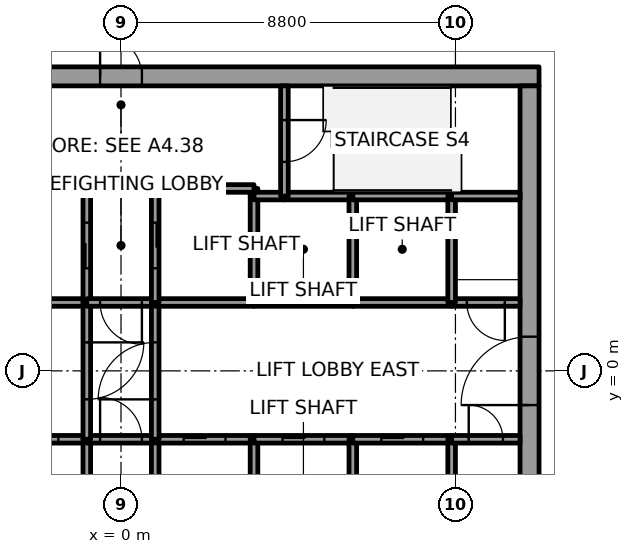
"""IFC4 building model, lengths in metres.
Left out: names, types, materials, properties, quantities, classifications, styles, units other than length and angle.
Written with IfcOpenShell. Run it as: python <this file> out.ifc"""

import sys

from ifc_helpers import new_model, si_unit, direction, frame, frame_2d, origin, place, context, subcontext, project, spatial, rectangle, extrude, element, fill, save


model = new_model("IFC4")
c1 = context("Model", 3, precision=1e-05, world=origin(), true_north=direction((0.0, 1.0)))
c2 = subcontext(c1, "Body", "Model", "MODEL_VIEW")
j1 = project(units=[si_unit("LENGTHUNIT", "METRE"), si_unit("PLANEANGLEUNIT", "RADIAN")], contexts=[c1])
p1 = place(None, origin())
s1 = spatial("IfcSite", under=j1, at=p1, CompositionType="ELEMENT")
p2 = place(p1, origin())
s2 = spatial("IfcBuilding", under=s1, at=p2, CompositionType="ELEMENT")
p3 = place(p2, frame((0.0, 0.0, 165.8)))
s3 = spatial("IfcBuildingStorey", under=s2, at=p3, CompositionType="ELEMENT", Elevation=165.8)
p4 = place(p3, frame((-11.0, 7.75, 0.0), z_axis=(0.0, 0.0, 1.0), x_axis=(1.0, 0.0, 0.0)))
e1 = element("IfcWall", 1, at=p4, inside=s3, PredefinedType="SHEAR", context=c2, shape_type="SweptSolid", body=[
    extrude(rectangle(XDim=22.0, YDim=0.5, at=frame_2d((11.0, 0.0))), origin(), (0.0, 0.0, 1.0), 4.0),
])
p5 = place(p4, frame((10.45, 0.0, 0.0)))
e2 = element("IfcOpeningElement", 2, at=p5, cuts=e1, PredefinedType="OPENING", context=c2, shape_type="SweptSolid", body=[
    extrude(rectangle(XDim=1.1, YDim=2.1, at=frame_2d((0.55, 1.05))), frame((0.0, 0.25, 0.0), z_axis=(0.0, -1.0, 0.0), x_axis=(1.0, 0.0, 0.0)), (0.0, 0.0, 1.0), 0.5),
])
p6 = place(p3, frame((10.75, -7.5, 0.0), z_axis=(0.0, 0.0, 1.0), x_axis=(0.0, 1.0, 0.0)))
e3 = element("IfcWall", 3, at=p6, inside=s3, PredefinedType="SHEAR", context=c2, shape_type="SweptSolid", body=[
    extrude(rectangle(XDim=15.0, YDim=0.5, at=frame_2d((7.5, 0.0))), origin(), (0.0, 0.0, 1.0), 4.0),
])
p7 = place(p6, frame((6.6, 0.0, 0.0)))
e4 = element("IfcOpeningElement", 4, at=p7, cuts=e3, PredefinedType="OPENING", context=c2, shape_type="SweptSolid", body=[
    extrude(rectangle(XDim=1.8, YDim=2.1, at=frame_2d((0.9, 1.05))), frame((0.0, 0.25, 0.0), z_axis=(0.0, -1.0, 0.0), x_axis=(1.0, 0.0, 0.0)), (0.0, 0.0, 1.0), 0.5),
])
p8 = place(p3, frame((-3.5, -1.8, 0.0), z_axis=(0.0, 0.0, 1.0), x_axis=(1.0, 0.0, 0.0)))
e5 = element("IfcWall", 5, at=p8, inside=s3, PredefinedType="SOLIDWALL", context=c2, shape_type="SweptSolid", body=[
    extrude(rectangle(XDim=2.6, YDim=0.2, at=frame_2d((1.3, 0.0))), origin(), (0.0, 0.0, 1.0), 3.85),
])
p9 = place(p8, frame((0.75, 0.0, 0.0)))
e6 = element("IfcOpeningElement", 6, at=p9, cuts=e5, PredefinedType="OPENING", context=c2, shape_type="SweptSolid", body=[
    extrude(rectangle(XDim=1.1, YDim=2.1, at=frame_2d((0.55, 1.05))), frame((0.0, 0.1, 0.0), z_axis=(0.0, -1.0, 0.0), x_axis=(1.0, 0.0, 0.0)), (0.0, 0.0, 1.0), 0.2),
])
p10 = place(p3, frame((-0.9, 1.8, 0.0), z_axis=(0.0, 0.0, 1.0), x_axis=(-1.0, 0.0, 0.0)))
e7 = element("IfcWall", 7, at=p10, inside=s3, PredefinedType="SOLIDWALL", context=c2, shape_type="SweptSolid", body=[
    extrude(rectangle(XDim=2.6, YDim=0.2, at=frame_2d((1.3, 0.0))), origin(), (0.0, 0.0, 1.0), 3.85),
])
p11 = place(p3, frame((-0.9, 1.8, 0.0), z_axis=(0.0, 0.0, 1.0), x_axis=(0.0, 1.0, 0.0)))
e8 = element("IfcWall", 8, at=p11, inside=s3, PredefinedType="SOLIDWALL", context=c2, shape_type="SweptSolid", body=[
    extrude(rectangle(XDim=3.0, YDim=0.2, at=frame_2d((1.5, 0.0))), origin(), (0.0, 0.0, 1.0), 3.85),
])
p12 = place(p11, frame((0.9, 0.0, 0.0)))
e9 = element("IfcOpeningElement", 9, at=p12, cuts=e8, PredefinedType="OPENING", context=c2, shape_type="SweptSolid", body=[
    extrude(rectangle(XDim=1.2, YDim=2.1, at=frame_2d((0.6, 1.05))), frame((0.0, 0.1, 0.0), z_axis=(0.0, -1.0, 0.0), x_axis=(1.0, 0.0, 0.0)), (0.0, 0.0, 1.0), 0.2),
])
p13 = place(p3, frame((-0.9, 4.8, 0.0), z_axis=(0.0, 0.0, 1.0), x_axis=(-1.0, 0.0, 0.0)))
e10 = element("IfcWall", 10, at=p13, inside=s3, PredefinedType="SOLIDWALL", context=c2, shape_type="SweptSolid", body=[
    extrude(rectangle(XDim=2.6, YDim=0.2, at=frame_2d((1.3, 0.0))), origin(), (0.0, 0.0, 1.0), 3.85),
])
p14 = place(p3, frame((-0.9, -4.6, 0.0), z_axis=(0.0, 0.0, 1.0), x_axis=(0.0, 1.0, 0.0)))
e11 = element("IfcWall", 11, at=p14, inside=s3, PredefinedType="SOLIDWALL", context=c2, shape_type="SweptSolid", body=[
    extrude(rectangle(XDim=2.8, YDim=0.2, at=frame_2d((1.4, 0.0))), origin(), (0.0, 0.0, 1.0), 3.85),
])
p15 = place(p3, frame((-0.9, -1.8, 0.0), z_axis=(0.0, 0.0, 1.0), x_axis=(1.0, 0.0, 0.0)))
e12 = element("IfcWall", 12, at=p15, inside=s3, PredefinedType="SOLIDWALL", context=c2, shape_type="SweptSolid", body=[
    extrude(rectangle(XDim=1.8, YDim=0.2, at=frame_2d((0.9, 0.0))), origin(), (0.0, 0.0, 1.0), 3.85),
])
p16 = place(p15, frame((0.35, 0.0, 0.0)))
e13 = element("IfcOpeningElement", 13, at=p16, cuts=e12, PredefinedType="OPENING", context=c2, shape_type="SweptSolid", body=[
    extrude(rectangle(XDim=1.1, YDim=2.1, at=frame_2d((0.55, 1.05))), frame((0.0, 0.1, 0.0), z_axis=(0.0, -1.0, 0.0), x_axis=(1.0, 0.0, 0.0)), (0.0, 0.0, 1.0), 0.2),
])
p17 = place(p3, frame((-0.9, 1.8, 0.0), z_axis=(0.0, 0.0, 1.0), x_axis=(0.0, -1.0, 0.0)))
e14 = element("IfcWall", 14, at=p17, inside=s3, PredefinedType="SOLIDWALL", context=c2, shape_type="SweptSolid", body=[
    extrude(rectangle(XDim=3.6, YDim=0.2, at=frame_2d((1.8, 0.0))), origin(), (0.0, 0.0, 1.0), 3.85),
])
p18 = place(p17, frame((1.05, 0.0, 0.0)))
e15 = element("IfcOpeningElement", 15, at=p18, cuts=e14, PredefinedType="OPENING", context=c2, shape_type="SweptSolid", body=[
    extrude(rectangle(XDim=1.5, YDim=2.1, at=frame_2d((0.75, 1.05))), frame((0.0, 0.1, 0.0), z_axis=(0.0, -1.0, 0.0), x_axis=(1.0, 0.0, 0.0)), (0.0, 0.0, 1.0), 0.2),
])
p19 = place(p3, frame((0.9, 1.8, 0.0), z_axis=(0.0, 0.0, 1.0), x_axis=(-1.0, 0.0, 0.0)))
e16 = element("IfcWall", 16, at=p19, inside=s3, PredefinedType="SOLIDWALL", context=c2, shape_type="SweptSolid", body=[
    extrude(rectangle(XDim=1.8, YDim=0.2, at=frame_2d((0.9, 0.0))), origin(), (0.0, 0.0, 1.0), 3.85),
])
p20 = place(p19, frame((0.35, 0.0, 0.0)))
e17 = element("IfcOpeningElement", 17, at=p20, cuts=e16, PredefinedType="OPENING", context=c2, shape_type="SweptSolid", body=[
    extrude(rectangle(XDim=1.1, YDim=2.1, at=frame_2d((0.55, 1.05))), frame((0.0, 0.1, 0.0), z_axis=(0.0, -1.0, 0.0), x_axis=(1.0, 0.0, 0.0)), (0.0, 0.0, 1.0), 0.2),
])
p21 = place(p3, frame((0.9, -1.8, 0.0), z_axis=(0.0, 0.0, 1.0), x_axis=(0.0, -1.0, 0.0)))
e18 = element("IfcWall", 18, at=p21, inside=s3, PredefinedType="SOLIDWALL", context=c2, shape_type="SweptSolid", body=[
    extrude(rectangle(XDim=2.8, YDim=0.2, at=frame_2d((1.4, 0.0))), origin(), (0.0, 0.0, 1.0), 3.85),
])
p22 = place(p3, frame((0.9, -1.8, 0.0), z_axis=(0.0, 0.0, 1.0), x_axis=(1.0, 0.0, 0.0)))
e19 = element("IfcWall", 19, at=p22, inside=s3, PredefinedType="SOLIDWALL", context=c2, shape_type="SweptSolid", body=[
    extrude(rectangle(XDim=2.6, YDim=0.2, at=frame_2d((1.3, 0.0))), origin(), (0.0, 0.0, 1.0), 3.85),
])
p23 = place(p22, frame((0.75, 0.0, 0.0)))
e20 = element("IfcOpeningElement", 20, at=p23, cuts=e19, PredefinedType="OPENING", context=c2, shape_type="SweptSolid", body=[
    extrude(rectangle(XDim=1.1, YDim=2.1, at=frame_2d((0.55, 1.05))), frame((0.0, 0.1, 0.0), z_axis=(0.0, -1.0, 0.0), x_axis=(1.0, 0.0, 0.0)), (0.0, 0.0, 1.0), 0.2),
])
p24 = place(p3, frame((0.9, -1.8, 0.0), z_axis=(0.0, 0.0, 1.0), x_axis=(0.0, 1.0, 0.0)))
e21 = element("IfcWall", 21, at=p24, inside=s3, PredefinedType="SOLIDWALL", context=c2, shape_type="SweptSolid", body=[
    extrude(rectangle(XDim=3.6, YDim=0.2, at=frame_2d((1.8, 0.0))), origin(), (0.0, 0.0, 1.0), 3.85),
])
p25 = place(p24, frame((1.05, 0.0, 0.0)))
e22 = element("IfcOpeningElement", 22, at=p25, cuts=e21, PredefinedType="OPENING", context=c2, shape_type="SweptSolid", body=[
    extrude(rectangle(XDim=1.5, YDim=2.1, at=frame_2d((0.75, 1.05))), frame((0.0, 0.1, 0.0), z_axis=(0.0, -1.0, 0.0), x_axis=(1.0, 0.0, 0.0)), (0.0, 0.0, 1.0), 0.2),
])
p26 = place(p3, frame((3.5, 1.8, 0.0), z_axis=(0.0, 0.0, 1.0), x_axis=(-1.0, 0.0, 0.0)))
e23 = element("IfcWall", 23, at=p26, inside=s3, PredefinedType="SOLIDWALL", context=c2, shape_type="SweptSolid", body=[
    extrude(rectangle(XDim=2.6, YDim=0.2, at=frame_2d((1.3, 0.0))), origin(), (0.0, 0.0, 1.0), 3.85),
])
p27 = place(p3, frame((3.5, 4.6, 0.0), z_axis=(0.0, 0.0, 1.0), x_axis=(0.0, 1.0, 0.0)))
e24 = element("IfcWall", 24, at=p27, inside=s3, PredefinedType="SOLIDWALL", context=c2, shape_type="SweptSolid", body=[
    extrude(rectangle(XDim=0.2, YDim=0.2, at=frame_2d((0.1, 0.0))), origin(), (0.0, 0.0, 1.0), 3.85),
])
p28 = place(p3, frame((3.5, 4.8, 0.0), z_axis=(0.0, 0.0, 1.0), x_axis=(-1.0, 0.0, 0.0)))
e25 = element("IfcWall", 25, at=p28, inside=s3, PredefinedType="SOLIDWALL", context=c2, shape_type="SweptSolid", body=[
    extrude(rectangle(XDim=2.6, YDim=0.2, at=frame_2d((1.3, 0.0))), origin(), (0.0, 0.0, 1.0), 3.85),
])
p29 = place(p3, frame((0.9, 4.8, 0.0), z_axis=(0.0, 0.0, 1.0), x_axis=(0.0, -1.0, 0.0)))
e26 = element("IfcWall", 26, at=p29, inside=s3, PredefinedType="SOLIDWALL", context=c2, shape_type="SweptSolid", body=[
    extrude(rectangle(XDim=3.0, YDim=0.2, at=frame_2d((1.5, 0.0))), origin(), (0.0, 0.0, 1.0), 3.85),
])
p30 = place(p29, frame((0.9, 0.0, 0.0)))
e27 = element("IfcOpeningElement", 27, at=p30, cuts=e26, PredefinedType="OPENING", context=c2, shape_type="SweptSolid", body=[
    extrude(rectangle(XDim=1.2, YDim=2.1, at=frame_2d((0.6, 1.05))), frame((0.0, 0.1, 0.0), z_axis=(0.0, -1.0, 0.0), x_axis=(1.0, 0.0, 0.0)), (0.0, 0.0, 1.0), 0.2),
])
p31 = place(p3, frame((3.5, -4.6, 0.0), z_axis=(0.0, 0.0, 1.0), x_axis=(0.0, 1.0, 0.0)))
e28 = element("IfcWall", 28, at=p31, inside=s3, PredefinedType="SOLIDWALL", context=c2, shape_type="SweptSolid", body=[
    extrude(rectangle(XDim=2.8, YDim=0.2, at=frame_2d((1.4, 0.0))), origin(), (0.0, 0.0, 1.0), 3.85),
])
p32 = place(p3, frame((3.5, -1.8, 0.0), z_axis=(0.0, 0.0, 1.0), x_axis=(1.0, 0.0, 0.0)))
e29 = element("IfcWall", 29, at=p32, inside=s3, PredefinedType="SOLIDWALL", context=c2, shape_type="SweptSolid", body=[
    extrude(rectangle(XDim=2.6, YDim=0.2, at=frame_2d((1.3, 0.0))), origin(), (0.0, 0.0, 1.0), 3.85),
])
p33 = place(p32, frame((0.75, 0.0, 0.0)))
e30 = element("IfcOpeningElement", 30, at=p33, cuts=e29, PredefinedType="OPENING", context=c2, shape_type="SweptSolid", body=[
    extrude(rectangle(XDim=1.1, YDim=2.1, at=frame_2d((0.55, 1.05))), frame((0.0, 0.1, 0.0), z_axis=(0.0, -1.0, 0.0), x_axis=(1.0, 0.0, 0.0)), (0.0, 0.0, 1.0), 0.2),
])
p34 = place(p3, frame((6.1, 1.8, 0.0), z_axis=(0.0, 0.0, 1.0), x_axis=(-1.0, 0.0, 0.0)))
e31 = element("IfcWall", 31, at=p34, inside=s3, PredefinedType="SOLIDWALL", context=c2, shape_type="SweptSolid", body=[
    extrude(rectangle(XDim=2.6, YDim=0.2, at=frame_2d((1.3, 0.0))), origin(), (0.0, 0.0, 1.0), 3.85),
])
p35 = place(p3, frame((3.5, 1.8, 0.0), z_axis=(0.0, 0.0, 1.0), x_axis=(0.0, 1.0, 0.0)))
e32 = element("IfcWall", 32, at=p35, inside=s3, PredefinedType="SOLIDWALL", context=c2, shape_type="SweptSolid", body=[
    extrude(rectangle(XDim=2.8, YDim=0.2, at=frame_2d((1.4, 0.0))), origin(), (0.0, 0.0, 1.0), 3.85),
])
p36 = place(p3, frame((4.3, 4.6, 0.0), z_axis=(0.0, 0.0, 1.0), x_axis=(-1.0, 0.0, 0.0)))
e33 = element("IfcWall", 33, at=p36, inside=s3, PredefinedType="SOLIDWALL", context=c2, shape_type="SweptSolid", body=[
    extrude(rectangle(XDim=0.8, YDim=0.2, at=frame_2d((0.4, 0.0))), origin(), (0.0, 0.0, 1.0), 3.85),
])
p37 = place(p3, frame((6.1, 4.6, 0.0), z_axis=(0.0, 0.0, 1.0), x_axis=(-1.0, 0.0, 0.0)))
e34 = element("IfcWall", 34, at=p37, inside=s3, PredefinedType="SOLIDWALL", context=c2, shape_type="SweptSolid", body=[
    extrude(rectangle(XDim=1.8, YDim=0.2, at=frame_2d((0.9, 0.0))), origin(), (0.0, 0.0, 1.0), 3.85),
])
p38 = place(p3, frame((4.3, 7.5, 0.0), z_axis=(0.0, 0.0, 1.0), x_axis=(0.0, -1.0, 0.0)))
e35 = element("IfcWall", 35, at=p38, inside=s3, PredefinedType="SOLIDWALL", context=c2, shape_type="SweptSolid", body=[
    extrude(rectangle(XDim=2.9, YDim=0.2, at=frame_2d((1.45, 0.0))), origin(), (0.0, 0.0, 1.0), 3.85),
])
p39 = place(p38, frame((0.9, 0.0, 0.0)))
e36 = element("IfcOpeningElement", 36, at=p39, cuts=e35, PredefinedType="OPENING", context=c2, shape_type="SweptSolid", body=[
    extrude(rectangle(XDim=1.1, YDim=2.1, at=frame_2d((0.55, 1.05))), frame((0.0, 0.1, 0.0), z_axis=(0.0, -1.0, 0.0), x_axis=(1.0, 0.0, 0.0)), (0.0, 0.0, 1.0), 0.2),
])
p40 = place(p3, frame((6.1, -4.6, 0.0), z_axis=(0.0, 0.0, 1.0), x_axis=(0.0, 1.0, 0.0)))
e37 = element("IfcWall", 37, at=p40, inside=s3, PredefinedType="SOLIDWALL", context=c2, shape_type="SweptSolid", body=[
    extrude(rectangle(XDim=2.8, YDim=0.2, at=frame_2d((1.4, 0.0))), origin(), (0.0, 0.0, 1.0), 3.85),
])
p41 = place(p3, frame((6.1, -1.8, 0.0), z_axis=(0.0, 0.0, 1.0), x_axis=(1.0, 0.0, 0.0)))
e38 = element("IfcWall", 38, at=p41, inside=s3, PredefinedType="SOLIDWALL", context=c2, shape_type="SweptSolid", body=[
    extrude(rectangle(XDim=2.6, YDim=0.2, at=frame_2d((1.3, 0.0))), origin(), (0.0, 0.0, 1.0), 3.85),
])
p42 = place(p41, frame((0.75, 0.0, 0.0)))
e39 = element("IfcOpeningElement", 39, at=p42, cuts=e38, PredefinedType="OPENING", context=c2, shape_type="SweptSolid", body=[
    extrude(rectangle(XDim=1.1, YDim=2.1, at=frame_2d((0.55, 1.05))), frame((0.0, 0.1, 0.0), z_axis=(0.0, -1.0, 0.0), x_axis=(1.0, 0.0, 0.0)), (0.0, 0.0, 1.0), 0.2),
])
p43 = place(p3, frame((8.7, 1.8, 0.0), z_axis=(0.0, 0.0, 1.0), x_axis=(-1.0, 0.0, 0.0)))
e40 = element("IfcWall", 40, at=p43, inside=s3, PredefinedType="SOLIDWALL", context=c2, shape_type="SweptSolid", body=[
    extrude(rectangle(XDim=2.6, YDim=0.2, at=frame_2d((1.3, 0.0))), origin(), (0.0, 0.0, 1.0), 3.85),
])
p44 = place(p3, frame((6.1, 1.8, 0.0), z_axis=(0.0, 0.0, 1.0), x_axis=(0.0, 1.0, 0.0)))
e41 = element("IfcWall", 41, at=p44, inside=s3, PredefinedType="SOLIDWALL", context=c2, shape_type="SweptSolid", body=[
    extrude(rectangle(XDim=2.8, YDim=0.2, at=frame_2d((1.4, 0.0))), origin(), (0.0, 0.0, 1.0), 3.85),
])
p45 = place(p3, frame((8.7, 4.6, 0.0), z_axis=(0.0, 0.0, 1.0), x_axis=(-1.0, 0.0, 0.0)))
e42 = element("IfcWall", 42, at=p45, inside=s3, PredefinedType="SOLIDWALL", context=c2, shape_type="SweptSolid", body=[
    extrude(rectangle(XDim=2.6, YDim=0.2, at=frame_2d((1.3, 0.0))), origin(), (0.0, 0.0, 1.0), 3.85),
])
p46 = place(p3, frame((8.7, -1.8, 0.0), z_axis=(0.0, 0.0, 1.0), x_axis=(0.0, -1.0, 0.0)))
e43 = element("IfcWall", 43, at=p46, inside=s3, PredefinedType="SOLIDWALL", context=c2, shape_type="SweptSolid", body=[
    extrude(rectangle(XDim=2.8, YDim=0.2, at=frame_2d((1.4, 0.0))), origin(), (0.0, 0.0, 1.0), 3.85),
])
p47 = place(p3, frame((8.7, -1.8, 0.0), z_axis=(0.0, 0.0, 1.0), x_axis=(1.0, 0.0, 0.0)))
e44 = element("IfcWall", 44, at=p47, inside=s3, PredefinedType="SOLIDWALL", context=c2, shape_type="SweptSolid", body=[
    extrude(rectangle(XDim=1.8, YDim=0.2, at=frame_2d((0.9, 0.0))), origin(), (0.0, 0.0, 1.0), 3.85),
])
p48 = place(p47, frame((0.45, 0.0, 0.0)))
e45 = element("IfcOpeningElement", 45, at=p48, cuts=e44, PredefinedType="OPENING", context=c2, shape_type="SweptSolid", body=[
    extrude(rectangle(XDim=0.9, YDim=2.1, at=frame_2d((0.45, 1.05))), frame((0.0, 0.1, 0.0), z_axis=(0.0, -1.0, 0.0), x_axis=(1.0, 0.0, 0.0)), (0.0, 0.0, 1.0), 0.2),
])
p49 = place(p3, frame((10.5, 1.8, 0.0), z_axis=(0.0, 0.0, 1.0), x_axis=(-1.0, 0.0, 0.0)))
e46 = element("IfcWall", 46, at=p49, inside=s3, PredefinedType="SOLIDWALL", context=c2, shape_type="SweptSolid", body=[
    extrude(rectangle(XDim=1.8, YDim=0.2, at=frame_2d((0.9, 0.0))), origin(), (0.0, 0.0, 1.0), 3.85),
])
p50 = place(p49, frame((0.4, 0.0, 0.0)))
e47 = element("IfcOpeningElement", 47, at=p50, cuts=e46, PredefinedType="OPENING", context=c2, shape_type="SweptSolid", body=[
    extrude(rectangle(XDim=1.0, YDim=2.1, at=frame_2d((0.5, 1.05))), frame((0.0, 0.1, 0.0), z_axis=(0.0, -1.0, 0.0), x_axis=(1.0, 0.0, 0.0)), (0.0, 0.0, 1.0), 0.2),
])
p51 = place(p3, frame((8.7, 4.6, 0.0), z_axis=(0.0, 0.0, 1.0), x_axis=(0.0, -1.0, 0.0)))
e48 = element("IfcWall", 48, at=p51, inside=s3, PredefinedType="SOLIDWALL", context=c2, shape_type="SweptSolid", body=[
    extrude(rectangle(XDim=2.8, YDim=0.2, at=frame_2d((1.4, 0.0))), origin(), (0.0, 0.0, 1.0), 3.85),
])
p52 = place(p3, frame((10.5, 4.6, 0.0), z_axis=(0.0, 0.0, 1.0), x_axis=(-1.0, 0.0, 0.0)))
e49 = element("IfcWall", 49, at=p52, inside=s3, PredefinedType="SOLIDWALL", context=c2, shape_type="SweptSolid", body=[
    extrude(rectangle(XDim=1.8, YDim=0.2, at=frame_2d((0.9, 0.0))), origin(), (0.0, 0.0, 1.0), 3.85),
])
p53 = place(p9, origin())
e50 = element("IfcDoor", 50, at=p53, inside=s3, OperationType="SLIDING_TO_RIGHT", PredefinedType="DOOR", context=c2, shape_type="SweptSolid", body=[
    extrude(rectangle(XDim=1.1, YDim=2.1, at=frame_2d((0.55, 1.05))), frame((0.0, 0.025, 0.0), z_axis=(0.0, -1.0, 0.0), x_axis=(1.0, 0.0, 0.0)), (0.0, 0.0, 1.0), 0.05),
])
fill(e6, e50)
p54 = place(p23, origin())
e51 = element("IfcDoor", 51, at=p54, inside=s3, OperationType="SLIDING_TO_LEFT", PredefinedType="DOOR", context=c2, shape_type="SweptSolid", body=[
    extrude(rectangle(XDim=1.1, YDim=2.1, at=frame_2d((0.55, 1.05))), frame((0.0, 0.025, 0.0), z_axis=(0.0, -1.0, 0.0), x_axis=(1.0, 0.0, 0.0)), (0.0, 0.0, 1.0), 0.05),
])
fill(e20, e51)
p55 = place(p33, origin())
e52 = element("IfcDoor", 52, at=p55, inside=s3, OperationType="SLIDING_TO_RIGHT", PredefinedType="DOOR", context=c2, shape_type="SweptSolid", body=[
    extrude(rectangle(XDim=1.1, YDim=2.1, at=frame_2d((0.55, 1.05))), frame((0.0, 0.025, 0.0), z_axis=(0.0, -1.0, 0.0), x_axis=(1.0, 0.0, 0.0)), (0.0, 0.0, 1.0), 0.05),
])
fill(e30, e52)
p56 = place(p42, origin())
e53 = element("IfcDoor", 53, at=p56, inside=s3, OperationType="SLIDING_TO_LEFT", PredefinedType="DOOR", context=c2, shape_type="SweptSolid", body=[
    extrude(rectangle(XDim=1.1, YDim=2.1, at=frame_2d((0.55, 1.05))), frame((0.0, 0.025, 0.0), z_axis=(0.0, -1.0, 0.0), x_axis=(1.0, 0.0, 0.0)), (0.0, 0.0, 1.0), 0.05),
])
fill(e39, e53)
p57 = place(p12, origin())
e54 = element("IfcDoor", 54, at=p57, inside=s3, OperationType="SLIDING_TO_LEFT", PredefinedType="DOOR", context=c2, shape_type="SweptSolid", body=[
    extrude(rectangle(XDim=1.2, YDim=2.1, at=frame_2d((0.6, 1.05))), frame((0.0, 0.025, 0.0), z_axis=(0.0, -1.0, 0.0), x_axis=(1.0, 0.0, 0.0)), (0.0, 0.0, 1.0), 0.05),
])
fill(e9, e54)
p58 = place(p30, origin())
e55 = element("IfcDoor", 55, at=p58, inside=s3, OperationType="SLIDING_TO_LEFT", PredefinedType="DOOR", context=c2, shape_type="SweptSolid", body=[
    extrude(rectangle(XDim=1.2, YDim=2.1, at=frame_2d((0.6, 1.05))), frame((0.0, 0.025, 0.0), z_axis=(0.0, -1.0, 0.0), x_axis=(1.0, 0.0, 0.0)), (0.0, 0.0, 1.0), 0.05),
])
fill(e27, e55)
p59 = place(p18, origin())
e56 = element("IfcDoor", 56, at=p59, inside=s3, OperationType="DOUBLE_DOOR_SINGLE_SWING", PredefinedType="DOOR", context=c2, shape_type="SweptSolid", body=[
    extrude(rectangle(XDim=1.5, YDim=2.1, at=frame_2d((0.75, 1.05))), frame((0.0, 0.025, 0.0), z_axis=(0.0, -1.0, 0.0), x_axis=(1.0, 0.0, 0.0)), (0.0, 0.0, 1.0), 0.05),
])
fill(e15, e56)
p60 = place(p25, origin())
e57 = element("IfcDoor", 57, at=p60, inside=s3, OperationType="DOUBLE_DOOR_SINGLE_SWING", PredefinedType="DOOR", context=c2, shape_type="SweptSolid", body=[
    extrude(rectangle(XDim=1.5, YDim=2.1, at=frame_2d((0.75, 1.05))), frame((0.0, 0.025, 0.0), z_axis=(0.0, -1.0, 0.0), x_axis=(1.0, 0.0, 0.0)), (0.0, 0.0, 1.0), 0.05),
])
fill(e22, e57)
p61 = place(p20, origin())
e58 = element("IfcDoor", 58, at=p61, inside=s3, OperationType="SINGLE_SWING_RIGHT", PredefinedType="DOOR", context=c2, shape_type="SweptSolid", body=[
    extrude(rectangle(XDim=1.1, YDim=2.1, at=frame_2d((0.55, 1.05))), frame((0.0, 0.025, 0.0), z_axis=(0.0, -1.0, 0.0), x_axis=(1.0, 0.0, 0.0)), (0.0, 0.0, 1.0), 0.05),
])
fill(e17, e58)
p62 = place(p16, origin())
e59 = element("IfcDoor", 59, at=p62, inside=s3, OperationType="SINGLE_SWING_RIGHT", PredefinedType="DOOR", context=c2, shape_type="SweptSolid", body=[
    extrude(rectangle(XDim=1.1, YDim=2.1, at=frame_2d((0.55, 1.05))), frame((0.0, 0.025, 0.0), z_axis=(0.0, -1.0, 0.0), x_axis=(1.0, 0.0, 0.0)), (0.0, 0.0, 1.0), 0.05),
])
fill(e13, e59)
p63 = place(p50, origin())
e60 = element("IfcDoor", 60, at=p63, inside=s3, OperationType="SINGLE_SWING_RIGHT", PredefinedType="DOOR", context=c2, shape_type="SweptSolid", body=[
    extrude(rectangle(XDim=1.0, YDim=2.1, at=frame_2d((0.5, 1.05))), frame((0.0, 0.025, 0.0), z_axis=(0.0, -1.0, 0.0), x_axis=(1.0, 0.0, 0.0)), (0.0, 0.0, 1.0), 0.05),
])
fill(e47, e60)
p64 = place(p39, origin())
e61 = element("IfcDoor", 61, at=p64, inside=s3, OperationType="SINGLE_SWING_RIGHT", PredefinedType="DOOR", context=c2, shape_type="SweptSolid", body=[
    extrude(rectangle(XDim=1.1, YDim=2.1, at=frame_2d((0.55, 1.05))), frame((0.0, 0.025, 0.0), z_axis=(0.0, -1.0, 0.0), x_axis=(1.0, 0.0, 0.0)), (0.0, 0.0, 1.0), 0.05),
])
fill(e36, e61)
p65 = place(p48, origin())
e62 = element("IfcDoor", 62, at=p65, inside=s3, OperationType="SINGLE_SWING_LEFT", PredefinedType="DOOR", context=c2, shape_type="SweptSolid", body=[
    extrude(rectangle(XDim=0.9, YDim=2.1, at=frame_2d((0.45, 1.05))), frame((0.0, 0.025, 0.0), z_axis=(0.0, -1.0, 0.0), x_axis=(1.0, 0.0, 0.0)), (0.0, 0.0, 1.0), 0.05),
])
fill(e45, e62)
p66 = place(p7, origin())
e63 = element("IfcDoor", 63, at=p66, inside=s3, OperationType="DOUBLE_DOOR_SINGLE_SWING", PredefinedType="DOOR", context=c2, shape_type="SweptSolid", body=[
    extrude(rectangle(XDim=1.8, YDim=2.1, at=frame_2d((0.9, 1.05))), frame((0.0, 0.025, 0.0), z_axis=(0.0, -1.0, 0.0), x_axis=(1.0, 0.0, 0.0)), (0.0, 0.0, 1.0), 0.05),
])
fill(e4, e63)
p67 = place(p5, origin())
e64 = element("IfcDoor", 64, at=p67, inside=s3, OperationType="SINGLE_SWING_LEFT", PredefinedType="DOOR", context=c2, shape_type="SweptSolid", body=[
    extrude(rectangle(XDim=1.1, YDim=2.1, at=frame_2d((0.55, 1.05))), frame((0.0, 0.025, 0.0), z_axis=(0.0, -1.0, 0.0), x_axis=(1.0, 0.0, 0.0)), (0.0, 0.0, 1.0), 0.05),
])
fill(e2, e64)
save(model, sys.argv[1])
